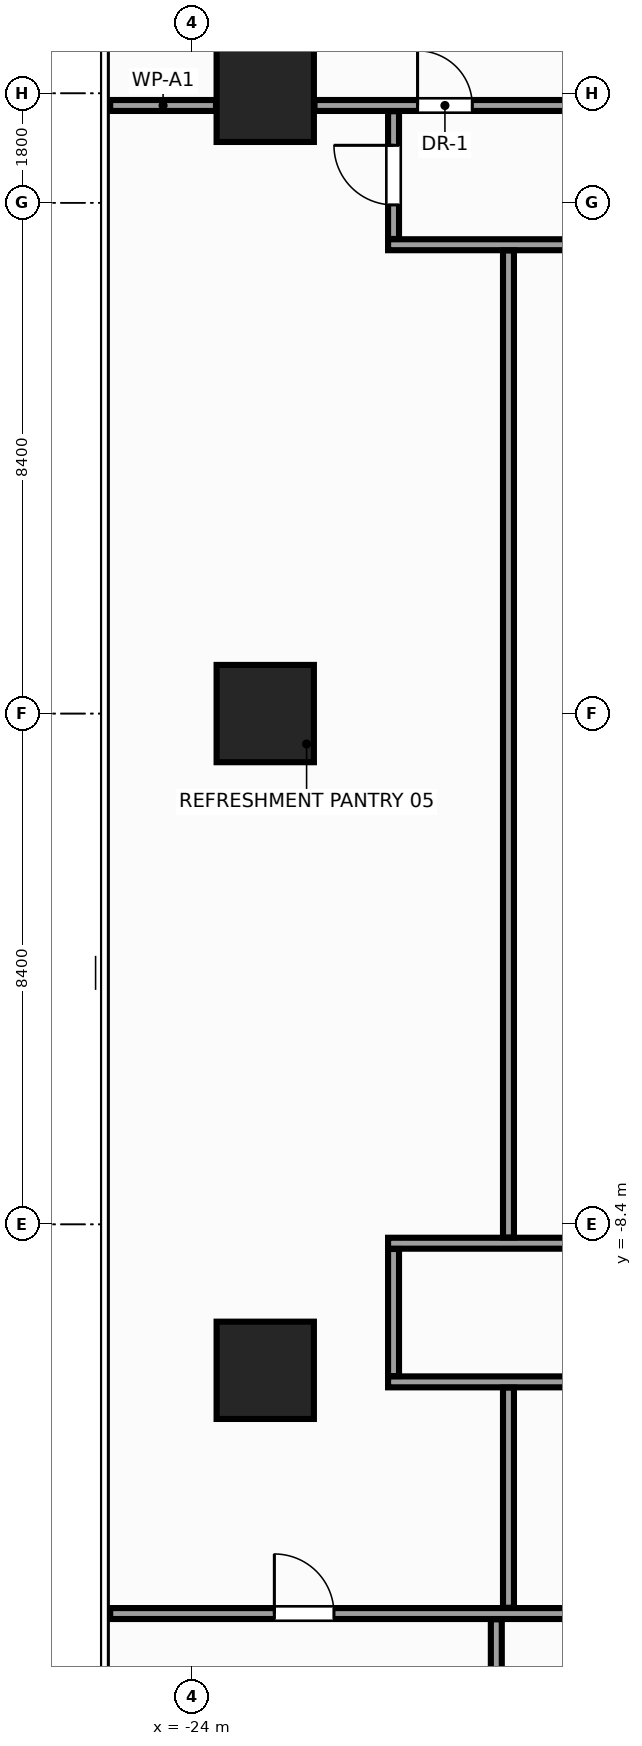
"""IFC4 building model, lengths in metres.
Left out: names, types, materials, properties, quantities, classifications, styles, units other than length and angle.
Written with IfcOpenShell. Run it as: python <this file> out.ifc"""

import sys

from ifc_helpers import new_model, si_unit, direction, frame, frame_2d, origin, origin_2d, place, context, subcontext, project, spatial, rectangle, extrude, source, transform, mapped, element, fill, save


model = new_model("IFC4")
c1 = context("Model", 3, precision=1e-05, world=origin(), true_north=direction((0.0, 1.0)))
c2 = subcontext(c1, "Body", "Model", "MODEL_VIEW")
j1 = project(units=[si_unit("LENGTHUNIT", "METRE"), si_unit("PLANEANGLEUNIT", "RADIAN")], contexts=[c1])
p1 = place(None, origin())
s1 = spatial("IfcSite", under=j1, at=p1, CompositionType="ELEMENT")
p2 = place(p1, origin())
s2 = spatial("IfcBuilding", under=s1, at=p2, CompositionType="ELEMENT")
p3 = place(p2, frame((0.0, 0.0, 120.8)))
s3 = spatial("IfcBuildingStorey", under=s2, at=p3, CompositionType="ELEMENT", Elevation=120.8)
m1 = source(origin(), c2, "Body", "SweptSolid", [
    extrude(rectangle(XDim=1.6, YDim=1.6, at=origin_2d()), origin(), (0.0, 0.0, 1.0), 3.6),
])
for number, where, z_axis, x_axis in (
    (1, (-22.8, -10.8, 0.0), (0.0, 0.0, 1.0), (1.0, 0.0, 0.0)),
    (2, (-22.8, 0.0, 0.0), (0.0, 0.0, 1.0), (1.0, 0.0, 0.0)),
    (3, (-22.8, 10.2, 0.0), (0.0, 0.0, 1.0), (1.0, 0.0, 0.0)),
):
    element("IfcColumn", number, at=place(p3, frame(where, z_axis=z_axis, x_axis=x_axis)), inside=s3, PredefinedType="COLUMN", context=c2, shape_type="MappedRepresentation", body=[
        mapped(m1, transform((0.0, 0.0, 0.0), x_axis=(1.0, 0.0, 0.0), y_axis=(0.0, 1.0, 0.0), z_axis=(0.0, 0.0, 1.0), scale=1.0)),
    ])
m2 = source(origin(), c2, "Body", "SweptSolid", [
    extrude(rectangle(XDim=1.74, YDim=0.18, at=frame_2d((0.87, 0.0))), origin(), (0.0, 0.0, 1.0), 3.3),
])
p4 = place(p3, frame((-25.35, 10.0, 0.0), z_axis=(0.0, 0.0, 1.0), x_axis=(1.0, 0.0, 0.0)))
e4 = element("IfcWall", 4, at=p4, inside=s3, PredefinedType="PARTITIONING", context=c2, shape_type="MappedRepresentation", body=[
    mapped(m2, transform((0.0, 0.0, 0.0), x_axis=(1.0, 0.0, 0.0), y_axis=(0.0, 1.0, 0.0), z_axis=(0.0, 0.0, 1.0), scale=1.0)),
])
m3 = source(origin(), c2, "Body", "SweptSolid", [
    extrude(rectangle(XDim=4.38, YDim=0.18, at=frame_2d((2.19, 0.0))), origin(), (0.0, 0.0, 1.0), 2.685),
])
p5 = place(p3, frame((-21.99, 10.0, 0.0), z_axis=(0.0, 0.0, 1.0), x_axis=(1.0, 0.0, 0.0)))
e5 = element("IfcWall", 5, at=p5, inside=s3, PredefinedType="PARTITIONING", context=c2, shape_type="MappedRepresentation", body=[
    mapped(m3, transform((0.0, 0.0, 0.0), x_axis=(1.0, 0.0, 0.0), y_axis=(0.0, 1.0, 0.0), z_axis=(0.0, 0.0, 1.0), scale=1.0)),
])
p6 = place(p5, frame((1.695, 0.0, 0.0)))
e6 = element("IfcOpeningElement", 6, at=p6, cuts=e5, PredefinedType="OPENING", context=c2, shape_type="SweptSolid", body=[
    extrude(rectangle(XDim=0.9, YDim=2.15, at=frame_2d((0.45, 1.075))), frame((0.0, 0.102, 0.0), z_axis=(0.0, -1.0, 0.0), x_axis=(1.0, 0.0, 0.0)), (0.0, 0.0, 1.0), 0.204),
])
m4 = source(origin(), c2, "Body", "SweptSolid", [
    extrude(rectangle(XDim=16.8, YDim=0.18, at=frame_2d((8.4, 0.0))), origin(), (0.0, 0.0, 1.0), 2.685),
])
p7 = place(p3, frame((-20.78, 7.71, 0.0), z_axis=(0.0, 0.0, 1.0), x_axis=(1.0, 0.0, 0.0)))
e7 = element("IfcWall", 7, at=p7, inside=s3, PredefinedType="PARTITIONING", context=c2, shape_type="MappedRepresentation", body=[
    mapped(m4, transform((0.0, 0.0, 0.0), x_axis=(1.0, 0.0, 0.0), y_axis=(0.0, 1.0, 0.0), z_axis=(0.0, 0.0, 1.0), scale=1.0)),
])
p8 = place(p7, frame((5.69, 0.0, 0.0)))
e8 = element("IfcOpeningElement", 8, at=p8, cuts=e7, PredefinedType="OPENING", context=c2, shape_type="SweptSolid", body=[
    extrude(rectangle(XDim=0.98, YDim=2.15, at=frame_2d((0.49, 1.075))), frame((0.0, 0.102, 0.0), z_axis=(0.0, -1.0, 0.0), x_axis=(1.0, 0.0, 0.0)), (0.0, 0.0, 1.0), 0.204),
])
p9 = place(p7, frame((13.085, 0.0, 0.0)))
e9 = element("IfcOpeningElement", 9, at=p9, cuts=e7, PredefinedType="OPENING", context=c2, shape_type="SweptSolid", body=[
    extrude(rectangle(XDim=0.98, YDim=2.15, at=frame_2d((0.49, 1.075))), frame((0.0, 0.102, 0.0), z_axis=(0.0, -1.0, 0.0), x_axis=(1.0, 0.0, 0.0)), (0.0, 0.0, 1.0), 0.204),
])
p10 = place(p3, frame((-20.78, -8.71, 0.0), z_axis=(0.0, 0.0, 1.0), x_axis=(1.0, 0.0, 0.0)))
e10 = element("IfcWall", 10, at=p10, inside=s3, PredefinedType="PARTITIONING", context=c2, shape_type="MappedRepresentation", body=[
    mapped(m4, transform((0.0, 0.0, 0.0), x_axis=(1.0, 0.0, 0.0), y_axis=(0.0, 1.0, 0.0), z_axis=(0.0, 0.0, 1.0), scale=1.0)),
])
m5 = source(origin(), c2, "Body", "SweptSolid", [
    extrude(rectangle(XDim=3.17, YDim=0.18, at=frame_2d((1.585, 0.0))), origin(), (0.0, 0.0, 1.0), 2.685),
])
p11 = place(p3, frame((-20.78, -10.99, 0.0), z_axis=(0.0, 0.0, 1.0), x_axis=(1.0, 0.0, 0.0)))
e11 = element("IfcWall", 11, at=p11, inside=s3, PredefinedType="PARTITIONING", context=c2, shape_type="MappedRepresentation", body=[
    mapped(m5, transform((0.0, 0.0, 0.0), x_axis=(1.0, 0.0, 0.0), y_axis=(0.0, 1.0, 0.0), z_axis=(0.0, 0.0, 1.0), scale=1.0)),
])
m6 = source(origin(), c2, "Body", "SweptSolid", [
    extrude(rectangle(XDim=2.1, YDim=0.18, at=frame_2d((1.05, 0.0))), origin(), (0.0, 0.0, 1.0), 3.3),
])
p12 = place(p3, frame((-20.69, 7.805, 0.0), z_axis=(0.0, 0.0, 1.0), x_axis=(0.0, 1.0, 0.0)))
e12 = element("IfcWall", 12, at=p12, inside=s3, PredefinedType="PARTITIONING", context=c2, shape_type="MappedRepresentation", body=[
    mapped(m6, transform((0.0, 0.0, 0.0), x_axis=(1.0, 0.0, 0.0), y_axis=(0.0, 1.0, 0.0), z_axis=(0.0, 0.0, 1.0), scale=1.0)),
])
p13 = place(p12, frame((0.56, 0.0, 0.0)))
e13 = element("IfcOpeningElement", 13, at=p13, cuts=e12, PredefinedType="OPENING", context=c2, shape_type="SweptSolid", body=[
    extrude(rectangle(XDim=0.98, YDim=2.15, at=frame_2d((0.49, 1.075))), frame((0.0, 0.102, 0.0), z_axis=(0.0, -1.0, 0.0), x_axis=(1.0, 0.0, 0.0)), (0.0, 0.0, 1.0), 0.204),
])
m7 = source(origin(), c2, "Body", "SweptSolid", [
    extrude(rectangle(XDim=2.09, YDim=0.18, at=frame_2d((1.045, 0.0))), origin(), (0.0, 0.0, 1.0), 3.3),
])
p14 = place(p3, frame((-20.69, -10.895, 0.0), z_axis=(0.0, 0.0, 1.0), x_axis=(0.0, 1.0, 0.0)))
e14 = element("IfcWall", 14, at=p14, inside=s3, PredefinedType="PARTITIONING", context=c2, shape_type="MappedRepresentation", body=[
    mapped(m7, transform((0.0, 0.0, 0.0), x_axis=(1.0, 0.0, 0.0), y_axis=(0.0, 1.0, 0.0), z_axis=(0.0, 0.0, 1.0), scale=1.0)),
])
m8 = source(origin(), c2, "Body", "SweptSolid", [
    extrude(rectangle(XDim=50.7, YDim=0.18, at=frame_2d((25.35, 0.0))), origin(), (0.0, 0.0, 1.0), 2.885),
])
p15 = place(p3, frame((-25.35, -14.8, 0.0), z_axis=(0.0, 0.0, 1.0), x_axis=(1.0, 0.0, 0.0)))
e15 = element("IfcWall", 15, at=p15, inside=s3, PredefinedType="PARTITIONING", context=c2, shape_type="MappedRepresentation", body=[
    mapped(m8, transform((0.0, 0.0, 0.0), x_axis=(1.0, 0.0, 0.0), y_axis=(0.0, 1.0, 0.0), z_axis=(0.0, 0.0, 1.0), scale=1.0)),
])
p16 = place(p15, frame((2.7, 0.0, 0.0)))
e16 = element("IfcOpeningElement", 16, at=p16, cuts=e15, PredefinedType="OPENING", context=c2, shape_type="SweptSolid", body=[
    extrude(rectangle(XDim=0.98, YDim=2.15, at=frame_2d((0.49, 1.075))), frame((0.0, 0.102, 0.0), z_axis=(0.0, -1.0, 0.0), x_axis=(1.0, 0.0, 0.0)), (0.0, 0.0, 1.0), 0.204),
])
p17 = place(p15, frame((46.42, 0.0, 0.0)))
e17 = element("IfcOpeningElement", 17, at=p17, cuts=e15, PredefinedType="OPENING", context=c2, shape_type="SweptSolid", body=[
    extrude(rectangle(XDim=0.98, YDim=2.15, at=frame_2d((0.49, 1.075))), frame((0.0, 0.102, 0.0), z_axis=(0.0, -1.0, 0.0), x_axis=(1.0, 0.0, 0.0)), (0.0, 0.0, 1.0), 0.204),
])
p18 = place(p15, frame((13.16, 0.0, 0.0)))
e18 = element("IfcOpeningElement", 18, at=p18, cuts=e15, PredefinedType="OPENING", context=c2, shape_type="SweptSolid", body=[
    extrude(rectangle(XDim=0.98, YDim=2.15, at=frame_2d((0.49, 1.075))), frame((0.0, 0.102, 0.0), z_axis=(0.0, -1.0, 0.0), x_axis=(1.0, 0.0, 0.0)), (0.0, 0.0, 1.0), 0.204),
])
p19 = place(p15, frame((22.16, 0.0, 0.0)))
e19 = element("IfcOpeningElement", 19, at=p19, cuts=e15, PredefinedType="OPENING", context=c2, shape_type="SweptSolid", body=[
    extrude(rectangle(XDim=0.98, YDim=2.15, at=frame_2d((0.49, 1.075))), frame((0.0, 0.102, 0.0), z_axis=(0.0, -1.0, 0.0), x_axis=(1.0, 0.0, 0.0)), (0.0, 0.0, 1.0), 0.204),
])
p20 = place(p15, frame((30.66, 0.0, 0.0)))
e20 = element("IfcOpeningElement", 20, at=p20, cuts=e15, PredefinedType="OPENING", context=c2, shape_type="SweptSolid", body=[
    extrude(rectangle(XDim=0.98, YDim=2.15, at=frame_2d((0.49, 1.075))), frame((0.0, 0.102, 0.0), z_axis=(0.0, -1.0, 0.0), x_axis=(1.0, 0.0, 0.0)), (0.0, 0.0, 1.0), 0.204),
])
p21 = place(p15, frame((8.96, 0.0, 0.0)))
e21 = element("IfcOpeningElement", 21, at=p21, cuts=e15, PredefinedType="OPENING", context=c2, shape_type="SweptSolid", body=[
    extrude(rectangle(XDim=0.98, YDim=2.15, at=frame_2d((0.49, 1.075))), frame((0.0, 0.102, 0.0), z_axis=(0.0, -1.0, 0.0), x_axis=(1.0, 0.0, 0.0)), (0.0, 0.0, 1.0), 0.204),
])
p22 = place(p15, frame((39.56, 0.0, 0.0)))
e22 = element("IfcOpeningElement", 22, at=p22, cuts=e15, PredefinedType="OPENING", context=c2, shape_type="SweptSolid", body=[
    extrude(rectangle(XDim=0.98, YDim=2.15, at=frame_2d((0.49, 1.075))), frame((0.0, 0.102, 0.0), z_axis=(0.0, -1.0, 0.0), x_axis=(1.0, 0.0, 0.0)), (0.0, 0.0, 1.0), 0.204),
])
m9 = source(origin(), c2, "Body", "SweptSolid", [
    extrude(rectangle(XDim=3.62, YDim=0.18, at=frame_2d((1.81, 0.0))), origin(), (0.0, 0.0, 1.0), 3.3),
])
p23 = place(p3, frame((-18.8, -14.705, 0.0), z_axis=(0.0, 0.0, 1.0), x_axis=(0.0, 1.0, 0.0)))
e23 = element("IfcWall", 23, at=p23, inside=s3, PredefinedType="PARTITIONING", context=c2, shape_type="MappedRepresentation", body=[
    mapped(m9, transform((0.0, 0.0, 0.0), x_axis=(1.0, 0.0, 0.0), y_axis=(0.0, 1.0, 0.0), z_axis=(0.0, 0.0, 1.0), scale=1.0)),
])
m10 = source(origin(), c2, "Body", "SweptSolid", [
    extrude(rectangle(XDim=16.23, YDim=0.18, at=frame_2d((8.115, 0.0))), origin(), (0.0, 0.0, 1.0), 2.685),
])
p24 = place(p3, frame((-18.8, -8.615, 0.0), z_axis=(0.0, 0.0, 1.0), x_axis=(0.0, 1.0, 0.0)))
e24 = element("IfcWall", 24, at=p24, inside=s3, PredefinedType="PARTITIONING", context=c2, shape_type="MappedRepresentation", body=[
    mapped(m10, transform((0.0, 0.0, 0.0), x_axis=(1.0, 0.0, 0.0), y_axis=(0.0, 1.0, 0.0), z_axis=(0.0, 0.0, 1.0), scale=1.0)),
])
m11 = source(origin(), c2, "Body", "SweptSolid", [
    extrude(rectangle(XDim=10.755, YDim=0.18, at=frame_2d((5.377, 0.0))), origin(), (0.0, 0.0, 1.0), 2.685),
])
p25 = place(p3, frame((-19.0, -25.65, 0.0), z_axis=(0.0, 0.0, 1.0), x_axis=(0.0, 1.0, 0.0)))
e25 = element("IfcWall", 25, at=p25, inside=s3, PredefinedType="PARTITIONING", context=c2, shape_type="MappedRepresentation", body=[
    mapped(m11, transform((0.0, 0.0, 0.0), x_axis=(1.0, 0.0, 0.0), y_axis=(0.0, 1.0, 0.0), z_axis=(0.0, 0.0, 1.0), scale=1.0)),
])
m12 = source(origin(), c2, "Body", "SweptSolid", [
    extrude(rectangle(XDim=0.9, YDim=2.15, at=frame_2d((0.45, 1.075))), frame((0.0, 0.025, 0.0), z_axis=(0.0, -1.0, 0.0), x_axis=(1.0, 0.0, 0.0)), (0.0, 0.0, 1.0), 0.05),
])
p26 = place(p6, origin())
e26 = element("IfcDoor", 26, at=p26, inside=s3, OperationType="SINGLE_SWING_LEFT", PredefinedType="DOOR", context=c2, shape_type="MappedRepresentation", body=[
    mapped(m12, transform((0.0, 0.0, 0.0), x_axis=(1.0, 0.0, 0.0), y_axis=(0.0, 1.0, 0.0), z_axis=(0.0, 0.0, 1.0), scale=1.0)),
])
fill(e6, e26)
m13 = source(origin(), c2, "Body", "SweptSolid", [
    extrude(rectangle(XDim=0.98, YDim=2.15, at=frame_2d((0.49, 1.075))), frame((0.0, 0.025, 0.0), z_axis=(0.0, -1.0, 0.0), x_axis=(1.0, 0.0, 0.0)), (0.0, 0.0, 1.0), 0.05),
])
p27 = place(p13, origin())
e27 = element("IfcDoor", 27, at=p27, inside=s3, OperationType="SINGLE_SWING_RIGHT", PredefinedType="DOOR", context=c2, shape_type="MappedRepresentation", body=[
    mapped(m13, transform((0.0, 0.0, 0.0), x_axis=(1.0, 0.0, 0.0), y_axis=(0.0, 1.0, 0.0), z_axis=(0.0, 0.0, 1.0), scale=1.0)),
])
fill(e13, e27)
p28 = place(p16, origin())
e28 = element("IfcDoor", 28, at=p28, inside=s3, OperationType="SINGLE_SWING_LEFT", PredefinedType="DOOR", context=c2, shape_type="MappedRepresentation", body=[
    mapped(m13, transform((0.0, 0.0, 0.0), x_axis=(1.0, 0.0, 0.0), y_axis=(0.0, 1.0, 0.0), z_axis=(0.0, 0.0, 1.0), scale=1.0)),
])
fill(e16, e28)
save(model, sys.argv[1])
